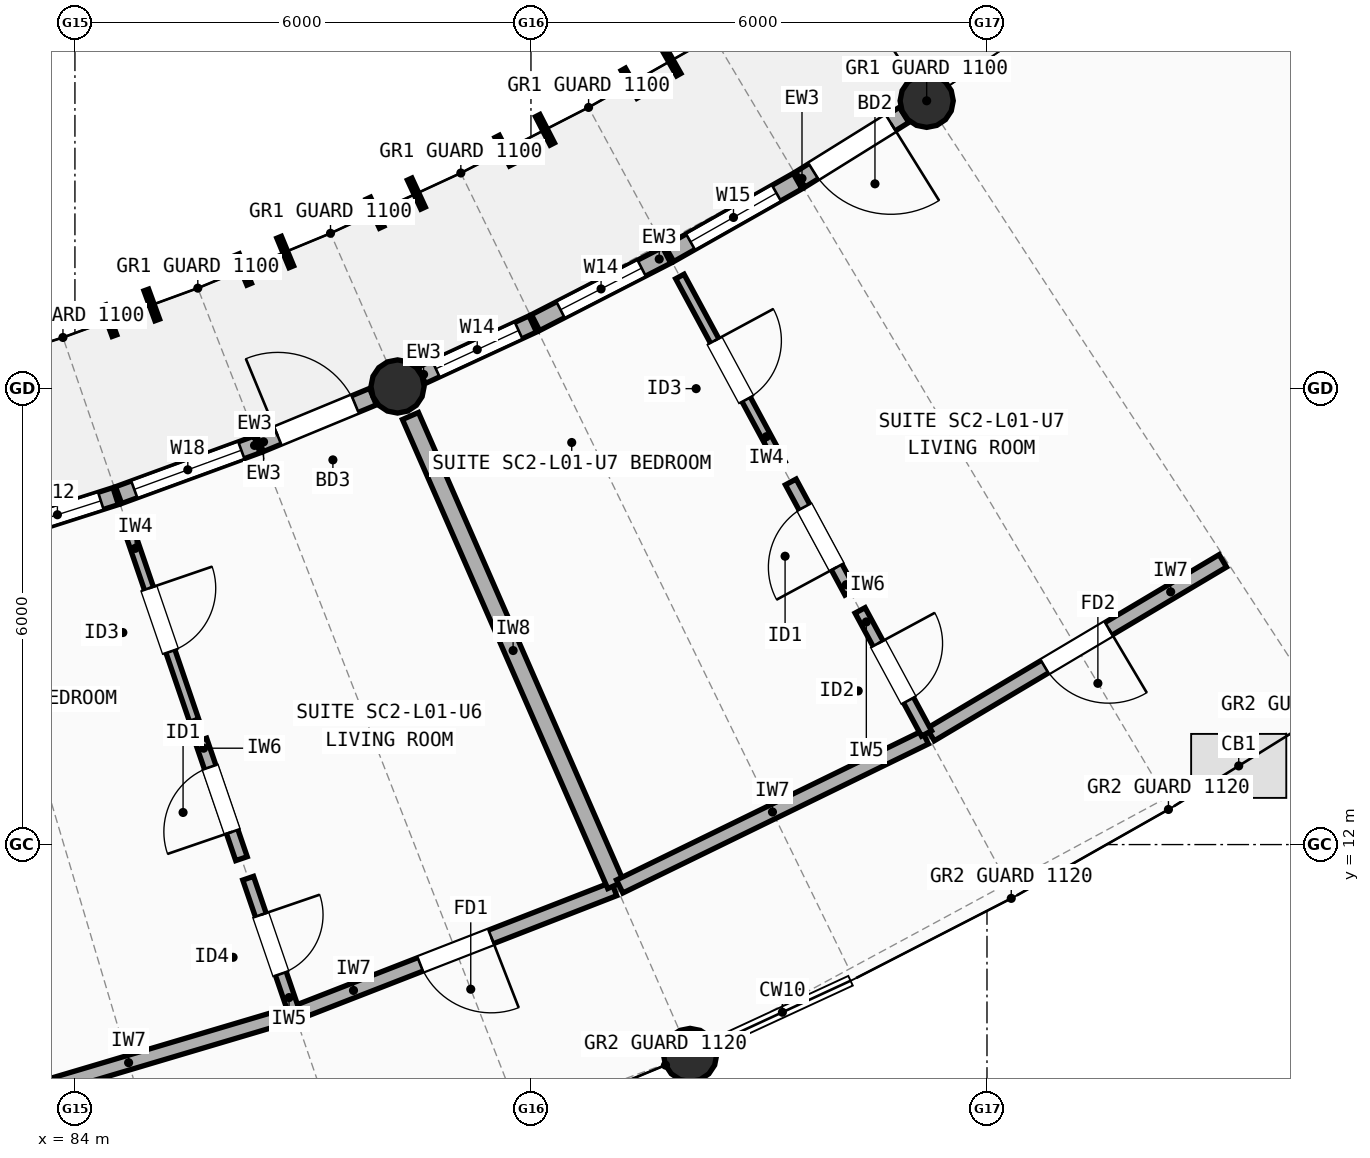
"""IFC4 building model, lengths in metres.
Left out: names, types, materials, properties, quantities, classifications, styles, units other than length and angle.
Written with IfcOpenShell. Run it as: python <this file> out.ifc"""

import sys

from ifc_helpers import new_model, si_unit, direction, frame, frame_2d, origin, origin_2d, place, context, subcontext, project, spatial, rectangle, circle, extrude, element, fill, save


model = new_model("IFC4")
c1 = context("Model", 3, precision=1e-05, world=origin(), true_north=direction((0.0, 1.0)))
c2 = subcontext(c1, "Body", "Model", "MODEL_VIEW")
j1 = project(units=[si_unit("LENGTHUNIT", "METRE"), si_unit("PLANEANGLEUNIT", "RADIAN")], contexts=[c1])
p1 = place(None, origin())
s1 = spatial("IfcSite", under=j1, at=p1, CompositionType="ELEMENT")
p2 = place(p1, origin())
s2 = spatial("IfcBuilding", under=s1, at=p2, CompositionType="ELEMENT")
p3 = place(p2, frame((0.0, 0.0, 4.5)))
s3 = spatial("IfcBuildingStorey", under=s2, at=p3, CompositionType="ELEMENT", Elevation=4.5)
for number, where, z_axis, x_axis in (
    (1, (88.245, 18.027, 0.0), (0.0, 0.0, 1.0), (1.0, 0.0, 0.0)),
    (2, (92.094, 9.232, 0.0), (0.0, 0.0, 1.0), (1.0, 0.0, 0.0)),
    (3, (95.207, 21.785, 0.0), (0.0, 0.0, 1.0), (1.0, 0.0, 0.0)),
):
    element("IfcColumn", number, at=place(p3, frame(where, z_axis=z_axis, x_axis=x_axis)), inside=s3, PredefinedType="COLUMN", context=c2, shape_type="SweptSolid", body=[
        extrude(circle(Radius=0.35, at=origin_2d()), origin(), (0.0, 0.0, 1.0), 2.948),
    ])
p4 = place(p3, frame((83.003, 16.094, 0.0), z_axis=(0.0, 0.0, 1.0), x_axis=(0.952508629145, 0.304511594861, 0.0)))
e4 = element("IfcWall", 4, at=p4, inside=s3, PredefinedType="STANDARD", context=c2, shape_type="SweptSolid", body=[
    extrude(rectangle(XDim=1.61, YDim=0.235, at=frame_2d((0.805, 0.0))), origin(), (0.0, 0.0, 1.0), 2.684),
])
p5 = place(p4, frame((0.205, 0.0, 0.85)))
e5 = element("IfcOpeningElement", 5, at=p5, cuts=e4, PredefinedType="OPENING", context=c2, shape_type="SweptSolid", body=[
    extrude(rectangle(XDim=1.2, YDim=1.35, at=frame_2d((0.6, 0.675))), frame((0.0, 0.127, 0.0), z_axis=(0.0, -1.0, 0.0), x_axis=(1.0, 0.0, 0.0)), (0.0, 0.0, 1.0), 0.255),
])
p6 = place(p3, frame((84.574, 16.597, 0.0), z_axis=(0.0, 0.0, 1.0), x_axis=(0.939178301307, 0.343429932235, 0.0)))
e6 = element("IfcWall", 6, at=p6, inside=s3, PredefinedType="STANDARD", context=c2, shape_type="SweptSolid", body=[
    extrude(rectangle(XDim=1.94, YDim=0.235, at=frame_2d((0.97, 0.0))), origin(), (0.0, 0.0, 1.0), 2.684),
])
p7 = place(p6, frame((0.22, 0.0, 0.85)))
e7 = element("IfcOpeningElement", 7, at=p7, cuts=e6, PredefinedType="OPENING", context=c2, shape_type="SweptSolid", body=[
    extrude(rectangle(XDim=1.5, YDim=1.4, at=frame_2d((0.75, 0.7))), frame((0.0, 0.127, 0.0), z_axis=(0.0, -1.0, 0.0), x_axis=(1.0, 0.0, 0.0)), (0.0, 0.0, 1.0), 0.255),
])
p8 = place(p3, frame((86.433, 17.278, 0.0), z_axis=(0.0, 0.0, 1.0), x_axis=(0.924159027547, 0.382007973481, 0.0)))
e8 = element("IfcWall", 8, at=p8, inside=s3, PredefinedType="STANDARD", context=c2, shape_type="SweptSolid", body=[
    extrude(rectangle(XDim=1.61, YDim=0.235, at=frame_2d((0.805, 0.0))), origin(), (0.0, 0.0, 1.0), 2.684),
])
p9 = place(p8, frame((0.255, 0.0, 0.0)))
e9 = element("IfcOpeningElement", 9, at=p9, cuts=e8, PredefinedType="OPENING", context=c2, shape_type="SweptSolid", body=[
    extrude(rectangle(XDim=1.1, YDim=2.15, at=frame_2d((0.55, 1.075))), frame((0.0, 0.127, 0.0), z_axis=(0.0, -1.0, 0.0), x_axis=(1.0, 0.0, 0.0)), (0.0, 0.0, 1.0), 0.255),
])
p10 = place(p3, frame((88.562, 18.174, 0.0), z_axis=(0.0, 0.0, 1.0), x_axis=(0.907572868664, 0.419894615427, 0.0)))
e10 = element("IfcWall", 10, at=p10, inside=s3, PredefinedType="STANDARD", context=c2, shape_type="SweptSolid", body=[
    extrude(rectangle(XDim=1.61, YDim=0.235, at=frame_2d((0.805, 0.0))), origin(), (0.0, 0.0, 1.0), 2.684),
])
p11 = place(p10, frame((0.205, 0.0, 0.85)))
e11 = element("IfcOpeningElement", 11, at=p11, cuts=e10, PredefinedType="OPENING", context=c2, shape_type="SweptSolid", body=[
    extrude(rectangle(XDim=1.2, YDim=1.5, at=frame_2d((0.6, 0.75))), frame((0.0, 0.127, 0.0), z_axis=(0.0, -1.0, 0.0), x_axis=(1.0, 0.0, 0.0)), (0.0, 0.0, 1.0), 0.255),
])
p12 = place(p3, frame((90.06, 18.867, 0.0), z_axis=(0.0, 0.0, 1.0), x_axis=(0.889517261343, 0.456901566832, 0.0)))
e12 = element("IfcWall", 12, at=p12, inside=s3, PredefinedType="STANDARD", context=c2, shape_type="SweptSolid", body=[
    extrude(rectangle(XDim=1.94, YDim=0.235, at=frame_2d((0.97, 0.0))), origin(), (0.0, 0.0, 1.0), 2.684),
])
p13 = place(p12, frame((0.37, 0.0, 0.85)))
e13 = element("IfcOpeningElement", 13, at=p13, cuts=e12, PredefinedType="OPENING", context=c2, shape_type="SweptSolid", body=[
    extrude(rectangle(XDim=1.2, YDim=1.5, at=frame_2d((0.6, 0.75))), frame((0.0, 0.127, 0.0), z_axis=(0.0, -1.0, 0.0), x_axis=(1.0, 0.0, 0.0)), (0.0, 0.0, 1.0), 0.255),
])
p14 = place(p3, frame((91.821, 19.772, 0.0), z_axis=(0.0, 0.0, 1.0), x_axis=(0.86993400964, 0.493168144623, 0.0)))
e14 = element("IfcWall", 14, at=p14, inside=s3, PredefinedType="STANDARD", context=c2, shape_type="SweptSolid", body=[
    extrude(rectangle(XDim=1.94, YDim=0.235, at=frame_2d((0.97, 0.0))), origin(), (0.0, 0.0, 1.0), 2.684),
])
p15 = place(p14, frame((0.32, 0.0, 0.85)))
e15 = element("IfcOpeningElement", 15, at=p15, cuts=e14, PredefinedType="OPENING", context=c2, shape_type="SweptSolid", body=[
    extrude(rectangle(XDim=1.3, YDim=1.45, at=frame_2d((0.65, 0.725))), frame((0.0, 0.127, 0.0), z_axis=(0.0, -1.0, 0.0), x_axis=(1.0, 0.0, 0.0)), (0.0, 0.0, 1.0), 0.255),
])
p16 = place(p3, frame((93.543, 20.75, 0.0), z_axis=(0.0, 0.0, 1.0), x_axis=(0.848934138406, 0.528498655296, 0.0)))
e16 = element("IfcWall", 16, at=p16, inside=s3, PredefinedType="STANDARD", context=c2, shape_type="SweptSolid", body=[
    extrude(rectangle(XDim=1.61, YDim=0.235, at=frame_2d((0.805, 0.0))), origin(), (0.0, 0.0, 1.0), 2.684),
])
p17 = place(p16, frame((0.205, 0.0, 0.0)))
e17 = element("IfcOpeningElement", 17, at=p17, cuts=e16, PredefinedType="OPENING", context=c2, shape_type="SweptSolid", body=[
    extrude(rectangle(XDim=1.2, YDim=2.15, at=frame_2d((0.6, 1.075))), frame((0.0, 0.127, 0.0), z_axis=(0.0, -1.0, 0.0), x_axis=(1.0, 0.0, 0.0)), (0.0, 0.0, 1.0), 0.255),
])
p18 = place(p3, frame((82.562, 8.494, 0.0), z_axis=(0.0, 0.0, 1.0), x_axis=(0.958602413557, 0.28474798107, 0.0)))
e18 = element("IfcWall", 18, at=p18, inside=s3, PredefinedType="SOLIDWALL", context=c2, shape_type="SweptSolid", body=[
    extrude(rectangle(XDim=4.473, YDim=0.19, at=frame_2d((2.236, 0.0))), origin(), (0.0, 0.0, 1.0), 2.722),
])
p19 = place(p3, frame((86.926, 9.793, 0.0), z_axis=(0.0, 0.0, 1.0), x_axis=(0.931847867525, 0.362849213571, 0.0)))
e19 = element("IfcWall", 19, at=p19, inside=s3, PredefinedType="SOLIDWALL", context=c2, shape_type="SweptSolid", body=[
    extrude(rectangle(XDim=4.473, YDim=0.19, at=frame_2d((2.237, 0.0))), origin(), (0.0, 0.0, 1.0), 2.762),
])
p20 = place(p19, frame((1.737, 0.0, 0.0)))
e20 = element("IfcOpeningElement", 20, at=p20, cuts=e19, PredefinedType="OPENING", context=c2, shape_type="SweptSolid", body=[
    extrude(rectangle(XDim=1.0, YDim=2.15, at=frame_2d((0.5, 1.075))), frame((0.0, 0.105, 0.0), z_axis=(0.0, -1.0, 0.0), x_axis=(1.0, 0.0, 0.0)), (0.0, 0.0, 1.0), 0.21),
])
p21 = place(p3, frame((84.662, 16.28, 0.0), z_axis=(0.0, 0.0, 1.0), x_axis=(0.32401221778, -0.94605289637, 0.0)))
e21 = element("IfcWall", 21, at=p21, inside=s3, PredefinedType="PARTITIONING", context=c2, shape_type="SweptSolid", body=[
    extrude(rectangle(XDim=2.8, YDim=0.125, at=frame_2d((1.4, 0.0))), origin(), (0.0, 0.0, 1.0), 2.742),
])
p22 = place(p21, frame((0.96, 0.0, 0.0)))
e22 = element("IfcOpeningElement", 22, at=p22, cuts=e21, PredefinedType="OPENING", context=c2, shape_type="SweptSolid", body=[
    extrude(rectangle(XDim=0.88, YDim=2.1, at=frame_2d((0.44, 1.05))), frame((0.0, 0.073, 0.0), z_axis=(0.0, -1.0, 0.0), x_axis=(1.0, 0.0, 0.0)), (0.0, 0.0, 1.0), 0.145),
])
p23 = place(p3, frame((85.657, 13.374, 0.0), z_axis=(0.0, 0.0, 1.0), x_axis=(0.324127376206, -0.946013448104, 0.0)))
e23 = element("IfcWall", 23, at=p23, inside=s3, PredefinedType="PLUMBINGWALL", context=c2, shape_type="SweptSolid", body=[
    extrude(rectangle(XDim=1.648, YDim=0.16, at=frame_2d((0.824, 0.0))), origin(), (0.0, 0.0, 1.0), 2.742),
])
p24 = place(p23, frame((0.374, 0.0, 0.0)))
e24 = element("IfcOpeningElement", 24, at=p24, cuts=e23, PredefinedType="OPENING", context=c2, shape_type="SweptSolid", body=[
    extrude(rectangle(XDim=0.9, YDim=2.1, at=frame_2d((0.45, 1.05))), frame((0.0, 0.09, 0.0), z_axis=(0.0, -1.0, 0.0), x_axis=(1.0, 0.0, 0.0)), (0.0, 0.0, 1.0), 0.18),
])
p25 = place(p3, frame((86.279, 11.558, 0.0), z_axis=(0.0, 0.0, 1.0), x_axis=(0.323978335312, -0.946064500046, 0.0)))
e25 = element("IfcWall", 25, at=p25, inside=s3, PredefinedType="PARTITIONING", context=c2, shape_type="SweptSolid", body=[
    extrude(rectangle(XDim=1.84, YDim=0.15, at=frame_2d((0.92, 0.0))), origin(), (0.0, 0.0, 1.0), 2.742),
])
p26 = place(p25, frame((0.51, 0.0, 0.0)))
e26 = element("IfcOpeningElement", 26, at=p26, cuts=e25, PredefinedType="OPENING", context=c2, shape_type="SweptSolid", body=[
    extrude(rectangle(XDim=0.82, YDim=2.08, at=frame_2d((0.41, 1.04))), frame((0.0, 0.085, 0.0), z_axis=(0.0, -1.0, 0.0), x_axis=(1.0, 0.0, 0.0)), (0.0, 0.0, 1.0), 0.17),
])
p27 = place(p3, frame((88.415, 17.638, 0.0), z_axis=(0.0, 0.0, 1.0), x_axis=(0.400932910895, -0.916107417807, 0.0)))
e27 = element("IfcWall", 27, at=p27, inside=s3, PredefinedType="SOLIDWALL", context=c2, shape_type="SweptSolid", body=[
    extrude(rectangle(XDim=6.736, YDim=0.23, at=frame_2d((3.368, 0.0))), origin(), (0.0, 0.0, 1.0), 2.722),
])
p28 = place(p3, frame((91.167, 11.448, 0.0), z_axis=(0.0, 0.0, 1.0), x_axis=(0.898794149603, 0.438370934985, 0.0)))
e28 = element("IfcWall", 28, at=p28, inside=s3, PredefinedType="SOLIDWALL", context=c2, shape_type="SweptSolid", body=[
    extrude(rectangle(XDim=4.473, YDim=0.19, at=frame_2d((2.236, 0.0))), origin(), (0.0, 0.0, 1.0), 2.742),
])
p29 = place(p3, frame((95.258, 13.447, 0.0), z_axis=(0.0, 0.0, 1.0), x_axis=(0.859614290038, 0.510943511909, 0.0)))
e29 = element("IfcWall", 29, at=p29, inside=s3, PredefinedType="SOLIDWALL", context=c2, shape_type="SweptSolid", body=[
    extrude(rectangle(XDim=4.473, YDim=0.19, at=frame_2d((2.236, 0.0))), origin(), (0.0, 0.0, 1.0), 2.722),
])
p30 = place(p29, frame((1.747, 0.0, 0.0)))
e30 = element("IfcOpeningElement", 30, at=p30, cuts=e29, PredefinedType="OPENING", context=c2, shape_type="SweptSolid", body=[
    extrude(rectangle(XDim=0.98, YDim=2.15, at=frame_2d((0.49, 1.075))), frame((0.0, 0.105, 0.0), z_axis=(0.0, -1.0, 0.0), x_axis=(1.0, 0.0, 0.0)), (0.0, 0.0, 1.0), 0.21),
])
p31 = place(p3, frame((91.959, 19.474, 0.0), z_axis=(0.0, 0.0, 1.0), x_axis=(0.475103009949, -0.879930184695, 0.0)))
e31 = element("IfcWall", 31, at=p31, inside=s3, PredefinedType="PARTITIONING", context=c2, shape_type="SweptSolid", body=[
    extrude(rectangle(XDim=2.8, YDim=0.125, at=frame_2d((1.4, 0.0))), origin(), (0.0, 0.0, 1.0), 2.762),
])
p32 = place(p31, frame((0.96, 0.0, 0.0)))
e32 = element("IfcOpeningElement", 32, at=p32, cuts=e31, PredefinedType="OPENING", context=c2, shape_type="SweptSolid", body=[
    extrude(rectangle(XDim=0.88, YDim=2.1, at=frame_2d((0.44, 1.05))), frame((0.0, 0.073, 0.0), z_axis=(0.0, -1.0, 0.0), x_axis=(1.0, 0.0, 0.0)), (0.0, 0.0, 1.0), 0.145),
])
p33 = place(p3, frame((93.418, 16.771, 0.0), z_axis=(0.0, 0.0, 1.0), x_axis=(0.475080097018, -0.879942555749, 0.0)))
e33 = element("IfcWall", 33, at=p33, inside=s3, PredefinedType="PLUMBINGWALL", context=c2, shape_type="SweptSolid", body=[
    extrude(rectangle(XDim=1.648, YDim=0.16, at=frame_2d((0.824, 0.0))), origin(), (0.0, 0.0, 1.0), 2.762),
])
p34 = place(p33, frame((0.374, 0.0, 0.0)))
e34 = element("IfcOpeningElement", 34, at=p34, cuts=e33, PredefinedType="OPENING", context=c2, shape_type="SweptSolid", body=[
    extrude(rectangle(XDim=0.9, YDim=2.1, at=frame_2d((0.45, 1.05))), frame((0.0, 0.09, 0.0), z_axis=(0.0, -1.0, 0.0), x_axis=(1.0, 0.0, 0.0)), (0.0, 0.0, 1.0), 0.18),
])
p35 = place(p3, frame((94.331, 15.081, 0.0), z_axis=(0.0, 0.0, 1.0), x_axis=(0.475017414672, -0.879976395001, 0.0)))
e35 = element("IfcWall", 35, at=p35, inside=s3, PredefinedType="PARTITIONING", context=c2, shape_type="SweptSolid", body=[
    extrude(rectangle(XDim=1.84, YDim=0.15, at=frame_2d((0.92, 0.0))), origin(), (0.0, 0.0, 1.0), 2.762),
])
p36 = place(p35, frame((0.495, 0.0, 0.0)))
e36 = element("IfcOpeningElement", 36, at=p36, cuts=e35, PredefinedType="OPENING", context=c2, shape_type="SweptSolid", body=[
    extrude(rectangle(XDim=0.85, YDim=2.1, at=frame_2d((0.425, 1.05))), frame((0.0, 0.085, 0.0), z_axis=(0.0, -1.0, 0.0), x_axis=(1.0, 0.0, 0.0)), (0.0, 0.0, 1.0), 0.17),
])
p37 = place(p5, origin())
e37 = element("IfcWindow", 37, at=p37, inside=s3, PartitioningType="SINGLE_PANEL", PredefinedType="WINDOW", context=c2, shape_type="SweptSolid", body=[
    extrude(rectangle(XDim=1.2, YDim=1.35, at=frame_2d((0.6, 0.675))), frame((0.0, 0.03, 0.0), z_axis=(0.0, -1.0, 0.0), x_axis=(1.0, 0.0, 0.0)), (0.0, 0.0, 1.0), 0.06),
])
fill(e5, e37)
p38 = place(p7, origin())
e38 = element("IfcWindow", 38, at=p38, inside=s3, PartitioningType="SINGLE_PANEL", PredefinedType="WINDOW", context=c2, shape_type="SweptSolid", body=[
    extrude(rectangle(XDim=1.5, YDim=1.4, at=frame_2d((0.75, 0.7))), frame((0.0, 0.03, 0.0), z_axis=(0.0, -1.0, 0.0), x_axis=(1.0, 0.0, 0.0)), (0.0, 0.0, 1.0), 0.06),
])
fill(e7, e38)
p39 = place(p9, origin())
e39 = element("IfcDoor", 39, at=p39, inside=s3, OperationType="SINGLE_SWING_LEFT", PredefinedType="DOOR", context=c2, shape_type="SweptSolid", body=[
    extrude(rectangle(XDim=1.1, YDim=2.15, at=frame_2d((0.55, 1.075))), frame((0.0, 0.025, 0.0), z_axis=(0.0, -1.0, 0.0), x_axis=(1.0, 0.0, 0.0)), (0.0, 0.0, 1.0), 0.05),
])
fill(e9, e39)
p40 = place(p11, origin())
e40 = element("IfcWindow", 40, at=p40, inside=s3, PartitioningType="SINGLE_PANEL", PredefinedType="WINDOW", context=c2, shape_type="SweptSolid", body=[
    extrude(rectangle(XDim=1.2, YDim=1.5, at=frame_2d((0.6, 0.75))), frame((0.0, 0.03, 0.0), z_axis=(0.0, -1.0, 0.0), x_axis=(1.0, 0.0, 0.0)), (0.0, 0.0, 1.0), 0.06),
])
fill(e11, e40)
p41 = place(p13, origin())
e41 = element("IfcWindow", 41, at=p41, inside=s3, PartitioningType="SINGLE_PANEL", PredefinedType="WINDOW", context=c2, shape_type="SweptSolid", body=[
    extrude(rectangle(XDim=1.2, YDim=1.5, at=frame_2d((0.6, 0.75))), frame((0.0, 0.03, 0.0), z_axis=(0.0, -1.0, 0.0), x_axis=(1.0, 0.0, 0.0)), (0.0, 0.0, 1.0), 0.06),
])
fill(e13, e41)
p42 = place(p15, origin())
e42 = element("IfcWindow", 42, at=p42, inside=s3, PartitioningType="SINGLE_PANEL", PredefinedType="WINDOW", context=c2, shape_type="SweptSolid", body=[
    extrude(rectangle(XDim=1.3, YDim=1.45, at=frame_2d((0.65, 0.725))), frame((0.0, 0.03, 0.0), z_axis=(0.0, -1.0, 0.0), x_axis=(1.0, 0.0, 0.0)), (0.0, 0.0, 1.0), 0.06),
])
fill(e15, e42)
p43 = place(p17, origin())
e43 = element("IfcDoor", 43, at=p43, inside=s3, OperationType="SINGLE_SWING_RIGHT", PredefinedType="DOOR", context=c2, shape_type="SweptSolid", body=[
    extrude(rectangle(XDim=1.2, YDim=2.15, at=frame_2d((0.6, 1.075))), frame((0.0, 0.025, 0.0), z_axis=(0.0, -1.0, 0.0), x_axis=(1.0, 0.0, 0.0)), (0.0, 0.0, 1.0), 0.05),
])
fill(e17, e43)
p44 = place(p20, origin())
e44 = element("IfcDoor", 44, at=p44, inside=s3, OperationType="SINGLE_SWING_RIGHT", PredefinedType="DOOR", context=c2, shape_type="SweptSolid", body=[
    extrude(rectangle(XDim=1.0, YDim=2.15, at=frame_2d((0.5, 1.075))), frame((0.0, 0.025, 0.0), z_axis=(0.0, -1.0, 0.0), x_axis=(1.0, 0.0, 0.0)), (0.0, 0.0, 1.0), 0.05),
])
fill(e20, e44)
p45 = place(p22, origin())
e45 = element("IfcDoor", 45, at=p45, inside=s3, OperationType="SINGLE_SWING_LEFT", PredefinedType="DOOR", context=c2, shape_type="SweptSolid", body=[
    extrude(rectangle(XDim=0.88, YDim=2.1, at=frame_2d((0.44, 1.05))), frame((0.0, 0.025, 0.0), z_axis=(0.0, -1.0, 0.0), x_axis=(1.0, 0.0, 0.0)), (0.0, 0.0, 1.0), 0.05),
])
fill(e22, e45)
p46 = place(p24, origin())
e46 = element("IfcDoor", 46, at=p46, inside=s3, OperationType="SINGLE_SWING_RIGHT", PredefinedType="DOOR", context=c2, shape_type="SweptSolid", body=[
    extrude(rectangle(XDim=0.9, YDim=2.1, at=frame_2d((0.45, 1.05))), frame((0.0, 0.025, 0.0), z_axis=(0.0, -1.0, 0.0), x_axis=(1.0, 0.0, 0.0)), (0.0, 0.0, 1.0), 0.05),
])
fill(e24, e46)
p47 = place(p26, origin())
e47 = element("IfcDoor", 47, at=p47, inside=s3, OperationType="SINGLE_SWING_LEFT", PredefinedType="DOOR", context=c2, shape_type="SweptSolid", body=[
    extrude(rectangle(XDim=0.82, YDim=2.08, at=frame_2d((0.41, 1.04))), frame((0.0, 0.025, 0.0), z_axis=(0.0, -1.0, 0.0), x_axis=(1.0, 0.0, 0.0)), (0.0, 0.0, 1.0), 0.05),
])
fill(e26, e47)
p48 = place(p30, origin())
e48 = element("IfcDoor", 48, at=p48, inside=s3, OperationType="SINGLE_SWING_RIGHT", PredefinedType="DOOR", context=c2, shape_type="SweptSolid", body=[
    extrude(rectangle(XDim=0.98, YDim=2.15, at=frame_2d((0.49, 1.075))), frame((0.0, 0.025, 0.0), z_axis=(0.0, -1.0, 0.0), x_axis=(1.0, 0.0, 0.0)), (0.0, 0.0, 1.0), 0.05),
])
fill(e30, e48)
p49 = place(p32, origin())
e49 = element("IfcDoor", 49, at=p49, inside=s3, OperationType="SINGLE_SWING_LEFT", PredefinedType="DOOR", context=c2, shape_type="SweptSolid", body=[
    extrude(rectangle(XDim=0.88, YDim=2.1, at=frame_2d((0.44, 1.05))), frame((0.0, 0.025, 0.0), z_axis=(0.0, -1.0, 0.0), x_axis=(1.0, 0.0, 0.0)), (0.0, 0.0, 1.0), 0.05),
])
fill(e32, e49)
p50 = place(p34, origin())
e50 = element("IfcDoor", 50, at=p50, inside=s3, OperationType="SINGLE_SWING_RIGHT", PredefinedType="DOOR", context=c2, shape_type="SweptSolid", body=[
    extrude(rectangle(XDim=0.9, YDim=2.1, at=frame_2d((0.45, 1.05))), frame((0.0, 0.025, 0.0), z_axis=(0.0, -1.0, 0.0), x_axis=(1.0, 0.0, 0.0)), (0.0, 0.0, 1.0), 0.05),
])
fill(e34, e50)
p51 = place(p36, origin())
e51 = element("IfcDoor", 51, at=p51, inside=s3, OperationType="SINGLE_SWING_LEFT", PredefinedType="DOOR", context=c2, shape_type="SweptSolid", body=[
    extrude(rectangle(XDim=0.85, YDim=2.1, at=frame_2d((0.425, 1.05))), frame((0.0, 0.025, 0.0), z_axis=(0.0, -1.0, 0.0), x_axis=(1.0, 0.0, 0.0)), (0.0, 0.0, 1.0), 0.05),
])
fill(e36, e51)
save(model, sys.argv[1])
